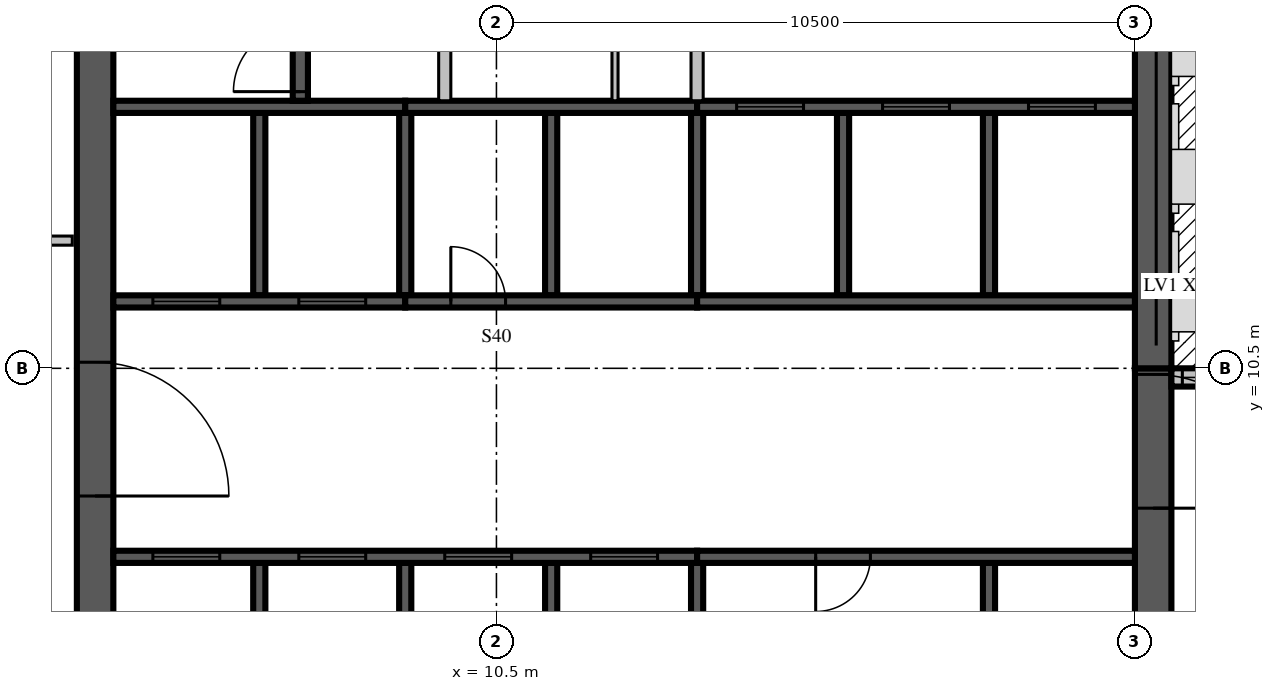
"""IFC4 building model, lengths in metres.
Left out: names, types, materials, properties, quantities, classifications, styles, units other than length and angle.
Written with IfcOpenShell. Run it as: python <this file> out.ifc"""

import sys

from ifc_helpers import new_model, si_unit, direction, frame, frame_2d, origin, place, context, subcontext, project, spatial, rectangle, extrude, source, transform, mapped, element, fill, save


model = new_model("IFC4")
c1 = context("Model", 3, precision=1e-05, world=origin(), true_north=direction((0.0, 1.0)))
c2 = subcontext(c1, "Body", "Model", "MODEL_VIEW")
j1 = project(units=[si_unit("LENGTHUNIT", "METRE"), si_unit("PLANEANGLEUNIT", "RADIAN")], contexts=[c1])
p1 = place(None, origin())
s1 = spatial("IfcSite", under=j1, at=p1, CompositionType="ELEMENT")
p2 = place(p1, origin())
s2 = spatial("IfcBuilding", under=s1, at=p2, CompositionType="ELEMENT")
p3 = place(p2, frame((0.0, 0.0, 284.5)))
s3 = spatial("IfcBuildingStorey", under=s2, at=p3, CompositionType="ELEMENT", Elevation=284.5)
p4 = place(p3, frame((3.9, 4.2, 0.0), z_axis=(0.0, 0.0, 1.0), x_axis=(0.0, 1.0, 0.0)))
e1 = element("IfcWall", 1, at=p4, inside=s3, PredefinedType="SHEAR", context=c2, shape_type="SweptSolid", body=[
    extrude(rectangle(XDim=17.4, YDim=0.6, at=frame_2d((8.7, 0.0))), origin(), (0.0, 0.0, 1.0), 3.5),
])
m1 = source(origin(), c2, "Body", "SweptSolid", [
    extrude(rectangle(XDim=2.2, YDim=2.1, at=frame_2d((1.1, 1.05))), frame((0.0, 0.31, 0.0), z_axis=(0.0, -1.0, 0.0), x_axis=(1.0, 0.0, 0.0)), (0.0, 0.0, 1.0), 0.62),
])
p5 = place(p4, frame((4.2, 0.0, 0.0)))
e2 = element("IfcOpeningElement", 2, at=p5, cuts=e1, PredefinedType="OPENING", context=c2, shape_type="MappedRepresentation", body=[
    mapped(m1, transform((0.0, 0.0, 0.0), scale=1.0)),
])
p6 = place(p3, frame((21.3, 4.2, 0.0), z_axis=(0.0, 0.0, 1.0), x_axis=(0.0, 1.0, 0.0)))
e3 = element("IfcWall", 3, at=p6, inside=s3, PredefinedType="SHEAR", context=c2, shape_type="SweptSolid", body=[
    extrude(rectangle(XDim=6.3, YDim=0.6, at=frame_2d((3.15, 0.0))), origin(), (0.0, 0.0, 1.0), 3.5),
])
p7 = place(p6, frame((4.0, 0.0, 0.0)))
e4 = element("IfcOpeningElement", 4, at=p7, cuts=e3, PredefinedType="OPENING", context=c2, shape_type="SweptSolid", body=[
    extrude(rectangle(XDim=2.2, YDim=2.1, at=frame_2d((1.1, 1.05))), frame((0.0, 0.31, 0.0), z_axis=(0.0, -1.0, 0.0), x_axis=(1.0, 0.0, 0.0)), (0.0, 0.0, 1.0), 0.62),
])
p8 = place(p3, frame((21.3, 10.5, 0.0), z_axis=(0.0, 0.0, 1.0), x_axis=(0.0, 1.0, 0.0)))
e5 = element("IfcWall", 5, at=p8, inside=s3, PredefinedType="SHEAR", context=c2, shape_type="SweptSolid", body=[
    extrude(rectangle(XDim=10.5, YDim=0.6, at=frame_2d((5.25, 0.0))), origin(), (0.0, 0.0, 1.0), 3.5),
])
p9 = place(p8, frame((5.7, 0.0, 0.6)))
e6 = element("IfcOpeningElement", 6, at=p9, cuts=e5, PredefinedType="OPENING", context=c2, shape_type="SweptSolid", body=[
    extrude(rectangle(XDim=1.2, YDim=2.4, at=frame_2d((0.6, 1.2))), frame((0.0, 0.31, 0.0), z_axis=(0.0, -1.0, 0.0), x_axis=(1.0, 0.0, 0.0)), (0.0, 0.0, 1.0), 0.62),
])
p10 = place(p3, frame((29.05, 10.35, 0.0), z_axis=(0.0, 0.0, 1.0), x_axis=(-1.0, 0.0, 0.0)))
e7 = element("IfcWall", 7, at=p10, inside=s3, PredefinedType="STANDARD", context=c2, shape_type="SweptSolid", body=[
    extrude(rectangle(XDim=7.45, YDim=0.3, at=frame_2d((3.725, 0.0))), origin(), (0.0, 0.0, 1.0), 3.1),
])
m2 = source(origin(), c2, "Body", "SweptSolid", [
    extrude(rectangle(XDim=1.8, YDim=2.4, at=frame_2d((0.9, 1.2))), frame((0.0, 0.16, 0.0), z_axis=(0.0, -1.0, 0.0), x_axis=(1.0, 0.0, 0.0)), (0.0, 0.0, 1.0), 0.32),
])
p11 = place(p10, frame((1.69, 0.0, 0.0)))
e8 = element("IfcOpeningElement", 8, at=p11, cuts=e7, PredefinedType="OPENING", context=c2, shape_type="MappedRepresentation", body=[
    mapped(m2, transform((0.0, 0.0, 0.0), scale=1.0)),
])
p12 = place(p10, frame((5.47, 0.0, 0.0)))
e9 = element("IfcOpeningElement", 9, at=p12, cuts=e7, PredefinedType="OPENING", context=c2, shape_type="MappedRepresentation", body=[
    mapped(m2, transform((0.0, 0.0, 0.0), scale=1.0)),
])
p13 = place(p3, frame((6.6, 4.2, 0.0), z_axis=(0.0, 0.0, 1.0), x_axis=(0.0, 1.0, 0.0)))
e10 = element("IfcWall", 10, at=p13, inside=s3, PredefinedType="SOLIDWALL", context=c2, shape_type="SweptSolid", body=[
    extrude(rectangle(XDim=3.1, YDim=0.2, at=frame_2d((1.55, 0.0))), origin(), (0.0, 0.0, 1.0), 3.5),
])
m3 = source(origin(), c2, "Body", "SweptSolid", [
    extrude(rectangle(XDim=3.1, YDim=0.2, at=frame_2d((1.55, 0.0))), origin(), (0.0, 0.0, 1.0), 3.5),
])
for number, where, z_axis, x_axis in (
    (11, (9.0, 4.2, 0.0), (0.0, 0.0, 1.0), (0.0, 1.0, 0.0)),
    (12, (11.4, 4.2, 0.0), (0.0, 0.0, 1.0), (0.0, 1.0, 0.0)),
):
    element("IfcWall", number, at=place(p3, frame(where, z_axis=z_axis, x_axis=x_axis)), inside=s3, PredefinedType="SOLIDWALL", context=c2, shape_type="MappedRepresentation", body=[
        mapped(m3, transform((0.0, 0.0, 0.0), scale=1.0)),
    ])
p14 = place(p3, frame((13.8, 4.2, 0.0), z_axis=(0.0, 0.0, 1.0), x_axis=(0.0, 1.0, 0.0)))
e13 = element("IfcWall", 13, at=p14, inside=s3, PredefinedType="SOLIDWALL", context=c2, shape_type="SweptSolid", body=[
    extrude(rectangle(XDim=3.1, YDim=0.2, at=frame_2d((1.55, 0.0))), origin(), (0.0, 0.0, 1.0), 3.1),
])
m4 = source(origin(), c2, "Body", "SweptSolid", [
    extrude(rectangle(XDim=3.1, YDim=0.2, at=frame_2d((1.55, 0.0))), origin(), (0.0, 0.0, 1.0), 3.1),
])
p15 = place(p3, frame((18.6, 4.2, 0.0), z_axis=(0.0, 0.0, 1.0), x_axis=(0.0, 1.0, 0.0)))
e14 = element("IfcWall", 14, at=p15, inside=s3, PredefinedType="SOLIDWALL", context=c2, shape_type="MappedRepresentation", body=[
    mapped(m4, transform((0.0, 0.0, 0.0), scale=1.0)),
])
p16 = place(p3, frame((6.6, 11.7, 0.0), z_axis=(0.0, 0.0, 1.0), x_axis=(0.0, 1.0, 0.0)))
e15 = element("IfcWall", 15, at=p16, inside=s3, PredefinedType="SOLIDWALL", context=c2, shape_type="SweptSolid", body=[
    extrude(rectangle(XDim=3.0, YDim=0.2, at=frame_2d((1.5, 0.0))), origin(), (0.0, 0.0, 1.0), 3.5),
])
p17 = place(p3, frame((9.0, 11.7, 0.0), z_axis=(0.0, 0.0, 1.0), x_axis=(0.0, 1.0, 0.0)))
e16 = element("IfcWall", 16, at=p17, inside=s3, PredefinedType="SOLIDWALL", context=c2, shape_type="SweptSolid", body=[
    extrude(rectangle(XDim=3.0, YDim=0.2, at=frame_2d((1.5, 0.0))), origin(), (0.0, 0.0, 1.0), 3.1),
])
m5 = source(origin(), c2, "Body", "SweptSolid", [
    extrude(rectangle(XDim=3.0, YDim=0.2, at=frame_2d((1.5, 0.0))), origin(), (0.0, 0.0, 1.0), 3.1),
])
for number, where, z_axis, x_axis in (
    (17, (11.4, 11.7, 0.0), (0.0, 0.0, 1.0), (0.0, 1.0, 0.0)),
    (18, (13.8, 11.7, 0.0), (0.0, 0.0, 1.0), (0.0, 1.0, 0.0)),
):
    element("IfcWall", number, at=place(p3, frame(where, z_axis=z_axis, x_axis=x_axis)), inside=s3, PredefinedType="SOLIDWALL", context=c2, shape_type="MappedRepresentation", body=[
        mapped(m5, transform((0.0, 0.0, 0.0), scale=1.0)),
    ])
m6 = source(origin(), c2, "Body", "SweptSolid", [
    extrude(rectangle(XDim=3.0, YDim=0.2, at=frame_2d((1.5, 0.0))), origin(), (0.0, 0.0, 1.0), 3.5),
])
for number, where, z_axis, x_axis in (
    (19, (16.2, 11.7, 0.0), (0.0, 0.0, 1.0), (0.0, 1.0, 0.0)),
    (20, (18.6, 11.7, 0.0), (0.0, 0.0, 1.0), (0.0, 1.0, 0.0)),
):
    element("IfcWall", number, at=place(p3, frame(where, z_axis=z_axis, x_axis=x_axis)), inside=s3, PredefinedType="SOLIDWALL", context=c2, shape_type="MappedRepresentation", body=[
        mapped(m6, transform((0.0, 0.0, 0.0), scale=1.0)),
    ])
p18 = place(p3, frame((4.2, 7.4, 0.0), z_axis=(0.0, 0.0, 1.0), x_axis=(1.0, 0.0, 0.0)))
e21 = element("IfcWall", 21, at=p18, inside=s3, PredefinedType="SOLIDWALL", context=c2, shape_type="SweptSolid", body=[
    extrude(rectangle(XDim=9.6, YDim=0.2, at=frame_2d((4.8, 0.0))), origin(), (0.0, 0.0, 1.0), 3.5),
])
m7 = source(origin(), c2, "Body", "SweptSolid", [
    extrude(rectangle(XDim=1.1, YDim=2.1, at=frame_2d((0.55, 1.05))), frame((0.0, 0.11, 0.0), z_axis=(0.0, -1.0, 0.0), x_axis=(1.0, 0.0, 0.0)), (0.0, 0.0, 1.0), 0.22),
])
p19 = place(p18, frame((0.65, 0.0, 0.0)))
e22 = element("IfcOpeningElement", 22, at=p19, cuts=e21, PredefinedType="OPENING", context=c2, shape_type="MappedRepresentation", body=[
    mapped(m7, transform((0.0, 0.0, 0.0), scale=1.0)),
])
p20 = place(p18, frame((3.05, 0.0, 0.0)))
e23 = element("IfcOpeningElement", 23, at=p20, cuts=e21, PredefinedType="OPENING", context=c2, shape_type="MappedRepresentation", body=[
    mapped(m7, transform((0.0, 0.0, 0.0), scale=1.0)),
])
p21 = place(p18, frame((5.45, 0.0, 0.0)))
e24 = element("IfcOpeningElement", 24, at=p21, cuts=e21, PredefinedType="OPENING", context=c2, shape_type="MappedRepresentation", body=[
    mapped(m7, transform((0.0, 0.0, 0.0), scale=1.0)),
])
p22 = place(p18, frame((7.85, 0.0, 0.0)))
e25 = element("IfcOpeningElement", 25, at=p22, cuts=e21, PredefinedType="OPENING", context=c2, shape_type="MappedRepresentation", body=[
    mapped(m7, transform((0.0, 0.0, 0.0), scale=1.0)),
])
p23 = place(p3, frame((13.8, 7.4, 0.0), z_axis=(0.0, 0.0, 1.0), x_axis=(1.0, 0.0, 0.0)))
e26 = element("IfcWall", 26, at=p23, inside=s3, PredefinedType="SOLIDWALL", context=c2, shape_type="SweptSolid", body=[
    extrude(rectangle(XDim=7.2, YDim=0.2, at=frame_2d((3.6, 0.0))), origin(), (0.0, 0.0, 1.0), 3.1),
])
m8 = source(origin(), c2, "Body", "SweptSolid", [
    extrude(rectangle(XDim=0.9, YDim=2.1, at=frame_2d((0.45, 1.05))), frame((0.0, 0.11, 0.0), z_axis=(0.0, -1.0, 0.0), x_axis=(1.0, 0.0, 0.0)), (0.0, 0.0, 1.0), 0.22),
])
p24 = place(p23, frame((1.95, 0.0, 0.0)))
e27 = element("IfcOpeningElement", 27, at=p24, cuts=e26, PredefinedType="OPENING", context=c2, shape_type="MappedRepresentation", body=[
    mapped(m8, transform((0.0, 0.0, 0.0), scale=1.0)),
])
p25 = place(p3, frame((4.2, 11.6, 0.0), z_axis=(0.0, 0.0, 1.0), x_axis=(1.0, 0.0, 0.0)))
e28 = element("IfcWall", 28, at=p25, inside=s3, PredefinedType="SOLIDWALL", context=c2, shape_type="SweptSolid", body=[
    extrude(rectangle(XDim=4.8, YDim=0.2, at=frame_2d((2.4, 0.0))), origin(), (0.0, 0.0, 1.0), 3.5),
])
p26 = place(p25, frame((0.65, 0.0, 0.0)))
e29 = element("IfcOpeningElement", 29, at=p26, cuts=e28, PredefinedType="OPENING", context=c2, shape_type="MappedRepresentation", body=[
    mapped(m7, transform((0.0, 0.0, 0.0), scale=1.0)),
])
p27 = place(p25, frame((3.05, 0.0, 0.0)))
e30 = element("IfcOpeningElement", 30, at=p27, cuts=e28, PredefinedType="OPENING", context=c2, shape_type="MappedRepresentation", body=[
    mapped(m7, transform((0.0, 0.0, 0.0), scale=1.0)),
])
p28 = place(p3, frame((9.0, 11.6, 0.0), z_axis=(0.0, 0.0, 1.0), x_axis=(1.0, 0.0, 0.0)))
e31 = element("IfcWall", 31, at=p28, inside=s3, PredefinedType="SOLIDWALL", context=c2, shape_type="SweptSolid", body=[
    extrude(rectangle(XDim=4.8, YDim=0.2, at=frame_2d((2.4, 0.0))), origin(), (0.0, 0.0, 1.0), 3.1),
])
p29 = place(p28, frame((0.75, 0.0, 0.0)))
e32 = element("IfcOpeningElement", 32, at=p29, cuts=e31, PredefinedType="OPENING", context=c2, shape_type="MappedRepresentation", body=[
    mapped(m8, transform((0.0, 0.0, 0.0), scale=1.0)),
])
p30 = place(p3, frame((13.8, 11.6, 0.0), z_axis=(0.0, 0.0, 1.0), x_axis=(1.0, 0.0, 0.0)))
e33 = element("IfcWall", 33, at=p30, inside=s3, PredefinedType="SOLIDWALL", context=c2, shape_type="SweptSolid", body=[
    extrude(rectangle(XDim=7.2, YDim=0.2, at=frame_2d((3.6, 0.0))), origin(), (0.0, 0.0, 1.0), 3.5),
])
m9 = source(origin(), c2, "Body", "SweptSolid", [
    extrude(rectangle(XDim=4.8, YDim=0.2, at=frame_2d((2.4, 0.0))), origin(), (0.0, 0.0, 1.0), 3.5),
])
p31 = place(p3, frame((4.2, 14.8, 0.0), z_axis=(0.0, 0.0, 1.0), x_axis=(1.0, 0.0, 0.0)))
e34 = element("IfcWall", 34, at=p31, inside=s3, PredefinedType="SOLIDWALL", context=c2, shape_type="MappedRepresentation", body=[
    mapped(m9, transform((0.0, 0.0, 0.0), scale=1.0)),
])
m10 = source(origin(), c2, "Body", "SweptSolid", [
    extrude(rectangle(XDim=4.8, YDim=0.2, at=frame_2d((2.4, 0.0))), origin(), (0.0, 0.0, 1.0), 3.1),
])
p32 = place(p3, frame((9.0, 14.8, 0.0), z_axis=(0.0, 0.0, 1.0), x_axis=(1.0, 0.0, 0.0)))
e35 = element("IfcWall", 35, at=p32, inside=s3, PredefinedType="SOLIDWALL", context=c2, shape_type="MappedRepresentation", body=[
    mapped(m10, transform((0.0, 0.0, 0.0), scale=1.0)),
])
m11 = source(origin(), c2, "Body", "SweptSolid", [
    extrude(rectangle(XDim=7.2, YDim=0.2, at=frame_2d((3.6, 0.0))), origin(), (0.0, 0.0, 1.0), 3.5),
])
p33 = place(p3, frame((13.8, 14.8, 0.0), z_axis=(0.0, 0.0, 1.0), x_axis=(1.0, 0.0, 0.0)))
e36 = element("IfcWall", 36, at=p33, inside=s3, PredefinedType="SOLIDWALL", context=c2, shape_type="MappedRepresentation", body=[
    mapped(m11, transform((0.0, 0.0, 0.0), scale=1.0)),
])
p34 = place(p33, frame((0.65, 0.0, 0.0)))
e37 = element("IfcOpeningElement", 37, at=p34, cuts=e36, PredefinedType="OPENING", context=c2, shape_type="MappedRepresentation", body=[
    mapped(m7, transform((0.0, 0.0, 0.0), scale=1.0)),
])
p35 = place(p33, frame((3.05, 0.0, 0.0)))
e38 = element("IfcOpeningElement", 38, at=p35, cuts=e36, PredefinedType="OPENING", context=c2, shape_type="MappedRepresentation", body=[
    mapped(m7, transform((0.0, 0.0, 0.0), scale=1.0)),
])
p36 = place(p33, frame((5.45, 0.0, 0.0)))
e39 = element("IfcOpeningElement", 39, at=p36, cuts=e36, PredefinedType="OPENING", context=c2, shape_type="MappedRepresentation", body=[
    mapped(m7, transform((0.0, 0.0, 0.0), scale=1.0)),
])
p37 = place(p3, frame((7.275, 14.9, 0.0), z_axis=(0.0, 0.0, 1.0), x_axis=(0.0, 1.0, 0.0)))
e40 = element("IfcWall", 40, at=p37, inside=s3, PredefinedType="SOLIDWALL", context=c2, shape_type="SweptSolid", body=[
    extrude(rectangle(XDim=6.6, YDim=0.25, at=frame_2d((3.3, 0.0))), origin(), (0.0, 0.0, 1.0), 3.1),
])
m12 = source(origin(), c2, "Body", "SweptSolid", [
    extrude(rectangle(XDim=1.1, YDim=2.1, at=frame_2d((0.55, 1.05))), frame((0.0, 0.135, 0.0), z_axis=(0.0, -1.0, 0.0), x_axis=(1.0, 0.0, 0.0)), (0.0, 0.0, 1.0), 0.27),
])
p38 = place(p37, frame((0.15, 0.0, 0.0)))
e41 = element("IfcOpeningElement", 41, at=p38, cuts=e40, PredefinedType="OPENING", context=c2, shape_type="MappedRepresentation", body=[
    mapped(m12, transform((0.0, 0.0, 0.0), scale=1.0)),
])
p39 = place(p3, frame((9.65, 14.9, 0.0), z_axis=(0.0, 0.0, 1.0), x_axis=(0.0, 1.0, 0.0)))
e42 = element("IfcWall", 42, at=p39, inside=s3, PredefinedType="PARTITIONING", context=c2, shape_type="SweptSolid", body=[
    extrude(rectangle(XDim=3.0, YDim=0.2, at=frame_2d((1.5, 0.0))), origin(), (0.0, 0.0, 1.0), 3.1),
])
m13 = source(origin(), c2, "Body", "SweptSolid", [
    extrude(rectangle(XDim=3.0, YDim=0.2, at=frame_2d((1.5, 0.0))), origin(), (0.0, 0.0, 1.0), 3.1),
])
p40 = place(p3, frame((13.8, 14.9, 0.0), z_axis=(0.0, 0.0, 1.0), x_axis=(0.0, 1.0, 0.0)))
e43 = element("IfcWall", 43, at=p40, inside=s3, PredefinedType="PARTITIONING", context=c2, shape_type="MappedRepresentation", body=[
    mapped(m13, transform((0.0, 0.0, 0.0), scale=1.0)),
])
p41 = place(p3, frame((12.45, 14.9, 0.0), z_axis=(0.0, 0.0, 1.0), x_axis=(0.0, 1.0, 0.0)))
e44 = element("IfcWall", 44, at=p41, inside=s3, PredefinedType="PARTITIONING", context=c2, shape_type="SweptSolid", body=[
    extrude(rectangle(XDim=3.0, YDim=0.1, at=frame_2d((1.5, 0.0))), origin(), (0.0, 0.0, 1.0), 3.1),
])
p42 = place(p3, frame((0.3, 12.6, 0.0), z_axis=(0.0, 0.0, 1.0), x_axis=(1.0, 0.0, 0.0)))
e45 = element("IfcWall", 45, at=p42, inside=s3, PredefinedType="PARTITIONING", context=c2, shape_type="SweptSolid", body=[
    extrude(rectangle(XDim=3.225, YDim=0.15, at=frame_2d((1.613, 0.0))), origin(), (0.0, 0.0, 1.0), 3.1),
])
m14 = source(origin(), c2, "Body", "SweptSolid", [
    extrude(rectangle(XDim=0.9, YDim=2.1, at=frame_2d((0.45, 1.05))), frame((0.0, 0.085, 0.0), z_axis=(0.0, -1.0, 0.0), x_axis=(1.0, 0.0, 0.0)), (0.0, 0.0, 1.0), 0.17),
])
p43 = place(p42, frame((1.2, 0.0, 0.0)))
e46 = element("IfcOpeningElement", 46, at=p43, cuts=e45, PredefinedType="OPENING", context=c2, shape_type="MappedRepresentation", body=[
    mapped(m14, transform((0.0, 0.0, 0.0), scale=1.0)),
])
m15 = source(origin(), c2, "Body", "SweptSolid", [
    extrude(rectangle(XDim=1.8, YDim=2.4, at=frame_2d((0.9, 1.2))), frame((0.0, 0.025, 0.0), z_axis=(0.0, -1.0, 0.0), x_axis=(1.0, 0.0, 0.0)), (0.0, 0.0, 1.0), 0.05),
])
p44 = place(p12, origin())
e47 = element("IfcDoor", 47, at=p44, inside=s3, OperationType="SLIDING_TO_LEFT", PredefinedType="DOOR", context=c2, shape_type="MappedRepresentation", body=[
    mapped(m15, transform((0.0, 0.0, 0.0), scale=1.0)),
])
fill(e9, e47)
m16 = source(origin(), c2, "Body", "SweptSolid", [
    extrude(rectangle(XDim=1.1, YDim=2.1, at=frame_2d((0.55, 1.05))), frame((0.0, 0.025, 0.0), z_axis=(0.0, -1.0, 0.0), x_axis=(1.0, 0.0, 0.0)), (0.0, 0.0, 1.0), 0.05),
])
p45 = place(p19, origin())
e48 = element("IfcDoor", 48, at=p45, inside=s3, OperationType="SLIDING_TO_LEFT", PredefinedType="DOOR", context=c2, shape_type="MappedRepresentation", body=[
    mapped(m16, transform((0.0, 0.0, 0.0), scale=1.0)),
])
fill(e22, e48)
p46 = place(p20, origin())
e49 = element("IfcDoor", 49, at=p46, inside=s3, OperationType="SLIDING_TO_LEFT", PredefinedType="DOOR", context=c2, shape_type="MappedRepresentation", body=[
    mapped(m16, transform((0.0, 0.0, 0.0), scale=1.0)),
])
fill(e23, e49)
p47 = place(p21, origin())
e50 = element("IfcDoor", 50, at=p47, inside=s3, OperationType="SLIDING_TO_LEFT", PredefinedType="DOOR", context=c2, shape_type="MappedRepresentation", body=[
    mapped(m16, transform((0.0, 0.0, 0.0), scale=1.0)),
])
fill(e24, e50)
p48 = place(p22, origin())
e51 = element("IfcDoor", 51, at=p48, inside=s3, OperationType="SLIDING_TO_LEFT", PredefinedType="DOOR", context=c2, shape_type="MappedRepresentation", body=[
    mapped(m16, transform((0.0, 0.0, 0.0), scale=1.0)),
])
fill(e25, e51)
m17 = source(origin(), c2, "Body", "SweptSolid", [
    extrude(rectangle(XDim=0.9, YDim=2.1, at=frame_2d((0.45, 1.05))), frame((0.0, 0.025, 0.0), z_axis=(0.0, -1.0, 0.0), x_axis=(1.0, 0.0, 0.0)), (0.0, 0.0, 1.0), 0.05),
])
p49 = place(p24, origin())
e52 = element("IfcDoor", 52, at=p49, inside=s3, OperationType="SINGLE_SWING_RIGHT", PredefinedType="DOOR", context=c2, shape_type="MappedRepresentation", body=[
    mapped(m17, transform((0.0, 0.0, 0.0), scale=1.0)),
])
fill(e27, e52)
p50 = place(p26, origin())
e53 = element("IfcDoor", 53, at=p50, inside=s3, OperationType="SLIDING_TO_LEFT", PredefinedType="DOOR", context=c2, shape_type="MappedRepresentation", body=[
    mapped(m16, transform((0.0, 0.0, 0.0), scale=1.0)),
])
fill(e29, e53)
p51 = place(p27, origin())
e54 = element("IfcDoor", 54, at=p51, inside=s3, OperationType="SLIDING_TO_LEFT", PredefinedType="DOOR", context=c2, shape_type="MappedRepresentation", body=[
    mapped(m16, transform((0.0, 0.0, 0.0), scale=1.0)),
])
fill(e30, e54)
p52 = place(p29, origin())
e55 = element("IfcDoor", 55, at=p52, inside=s3, OperationType="SINGLE_SWING_LEFT", PredefinedType="DOOR", context=c2, shape_type="MappedRepresentation", body=[
    mapped(m17, transform((0.0, 0.0, 0.0), scale=1.0)),
])
fill(e32, e55)
p53 = place(p34, origin())
e56 = element("IfcDoor", 56, at=p53, inside=s3, OperationType="SLIDING_TO_LEFT", PredefinedType="DOOR", context=c2, shape_type="MappedRepresentation", body=[
    mapped(m16, transform((0.0, 0.0, 0.0), scale=1.0)),
])
fill(e37, e56)
p54 = place(p35, origin())
e57 = element("IfcDoor", 57, at=p54, inside=s3, OperationType="SLIDING_TO_LEFT", PredefinedType="DOOR", context=c2, shape_type="MappedRepresentation", body=[
    mapped(m16, transform((0.0, 0.0, 0.0), scale=1.0)),
])
fill(e38, e57)
p55 = place(p36, origin())
e58 = element("IfcDoor", 58, at=p55, inside=s3, OperationType="SLIDING_TO_LEFT", PredefinedType="DOOR", context=c2, shape_type="MappedRepresentation", body=[
    mapped(m16, transform((0.0, 0.0, 0.0), scale=1.0)),
])
fill(e39, e58)
p56 = place(p38, origin())
e59 = element("IfcDoor", 59, at=p56, inside=s3, OperationType="SINGLE_SWING_LEFT", PredefinedType="DOOR", context=c2, shape_type="MappedRepresentation", body=[
    mapped(m16, transform((0.0, 0.0, 0.0), scale=1.0)),
])
fill(e41, e59)
m18 = source(origin(), c2, "Body", "SweptSolid", [
    extrude(rectangle(XDim=2.2, YDim=2.1, at=frame_2d((1.1, 1.05))), frame((0.0, 0.025, 0.0), z_axis=(0.0, -1.0, 0.0), x_axis=(1.0, 0.0, 0.0)), (0.0, 0.0, 1.0), 0.05),
])
p57 = place(p7, origin())
e60 = element("IfcDoor", 60, at=p57, inside=s3, OperationType="DOUBLE_DOOR_SINGLE_SWING", PredefinedType="DOOR", context=c2, shape_type="MappedRepresentation", body=[
    mapped(m18, transform((0.0, 0.0, 0.0), scale=1.0)),
])
fill(e4, e60)
p58 = place(p5, origin())
e61 = element("IfcDoor", 61, at=p58, inside=s3, OperationType="DOUBLE_DOOR_SINGLE_SWING", PredefinedType="DOOR", context=c2, shape_type="MappedRepresentation", body=[
    mapped(m18, transform((0.0, 0.0, 0.0), scale=1.0)),
])
fill(e2, e61)
save(model, sys.argv[1])
